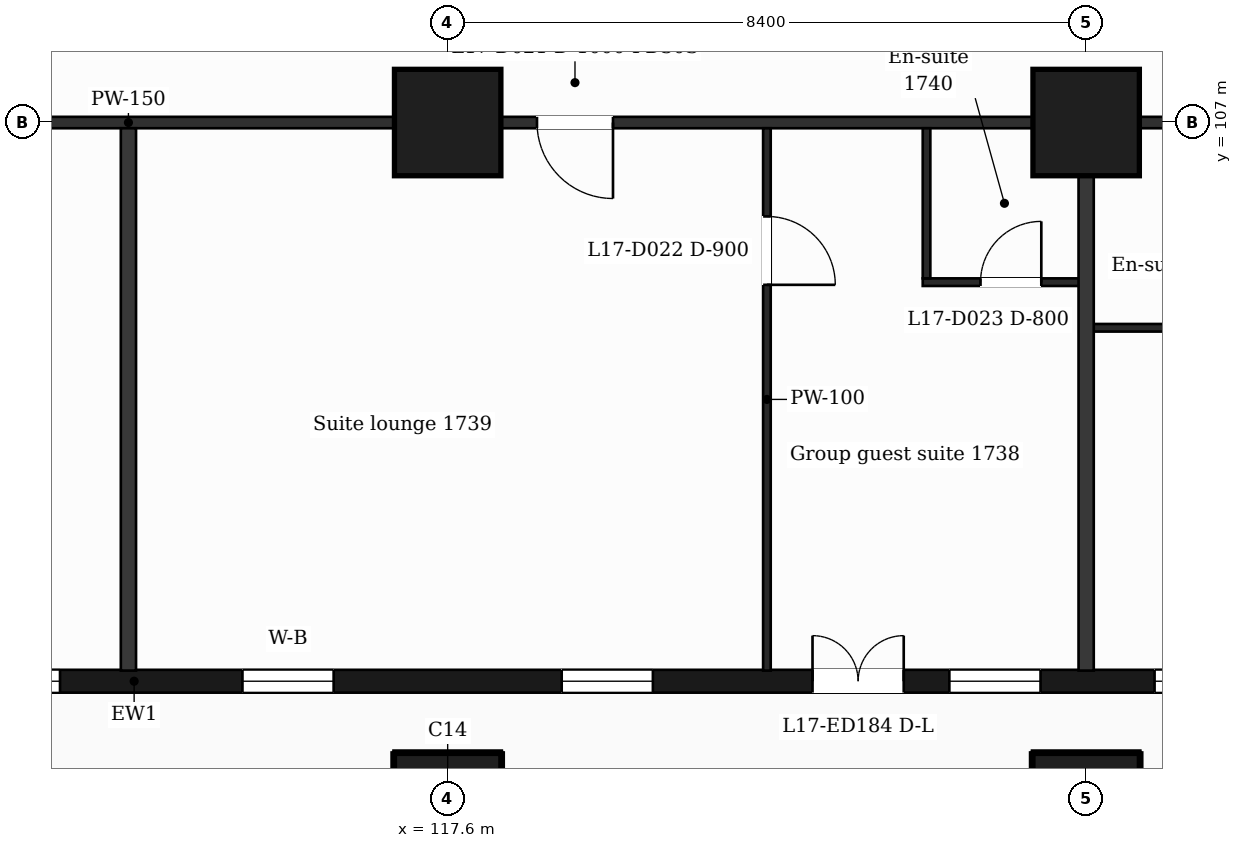
"""IFC4 building model, lengths in metres.
Left out: names, types, materials, properties, quantities, classifications, styles, units other than length and angle.
Written with IfcOpenShell. Run it as: python <this file> out.ifc"""

import sys

from ifc_helpers import new_model, si_unit, direction, frame, frame_2d, origin, origin_2d, place, context, subcontext, project, spatial, rectangle, extrude, element, fill, save


model = new_model("IFC4")
c1 = context("Model", 3, precision=1e-05, world=origin(), true_north=direction((0.0, 1.0)))
c2 = subcontext(c1, "Body", "Model", "MODEL_VIEW")
j1 = project(units=[si_unit("LENGTHUNIT", "METRE"), si_unit("PLANEANGLEUNIT", "RADIAN")], contexts=[c1])
p1 = place(None, origin())
s1 = spatial("IfcSite", under=j1, at=p1, CompositionType="ELEMENT")
p2 = place(p1, origin())
s2 = spatial("IfcBuilding", under=s1, at=p2, CompositionType="ELEMENT")
p3 = place(p2, frame((0.0, 0.0, 77.5)))
s3 = spatial("IfcBuildingStorey", under=s2, at=p3, CompositionType="ELEMENT", Elevation=77.5)
for number, where, z_axis, x_axis in (
    (1, (117.6, 98.0, 0.0), (0.0, 0.0, 1.0), (1.0, 0.0, 0.0)),
    (2, (126.0, 98.0, 0.0), (0.0, 0.0, 1.0), (1.0, 0.0, 0.0)),
    (3, (117.6, 107.0, 0.0), (0.0, 0.0, 1.0), (1.0, 0.0, 0.0)),
    (4, (126.0, 107.0, 0.0), (0.0, 0.0, 1.0), (1.0, 0.0, 0.0)),
):
    element("IfcColumn", number, at=place(p3, frame(where, z_axis=z_axis, x_axis=x_axis)), inside=s3, PredefinedType="COLUMN", context=c2, shape_type="SweptSolid", body=[
        extrude(rectangle(XDim=1.4, YDim=1.4, at=origin_2d()), origin(), (0.0, 0.0, 1.0), 3.5),
    ])
p4 = place(p3, frame((89.85, 99.65, 0.0), z_axis=(0.0, 0.0, 1.0), x_axis=(1.0, 0.0, 0.0)))
e5 = element("IfcWall", 5, at=p4, inside=s3, PredefinedType="SOLIDWALL", context=c2, shape_type="SweptSolid", body=[
    extrude(rectangle(XDim=47.25, YDim=0.3, at=frame_2d((23.625, 0.0))), origin(), (0.0, 0.0, 1.0), 3.0),
])
p5 = place(p4, frame((0.725, 0.0, 0.9)))
e6 = element("IfcOpeningElement", 6, at=p5, cuts=e5, PredefinedType="OPENING", context=c2, shape_type="SweptSolid", body=[
    extrude(rectangle(XDim=1.2, YDim=2.1, at=frame_2d((0.6, 1.05))), frame((0.0, 0.16, 0.0), z_axis=(0.0, -1.0, 0.0), x_axis=(1.0, 0.0, 0.0)), (0.0, 0.0, 1.0), 0.32),
])
p6 = place(p4, frame((3.45, 0.0, 0.9)))
e7 = element("IfcOpeningElement", 7, at=p6, cuts=e5, PredefinedType="OPENING", context=c2, shape_type="SweptSolid", body=[
    extrude(rectangle(XDim=2.4, YDim=2.1, at=frame_2d((1.2, 1.05))), frame((0.0, 0.16, 0.0), z_axis=(0.0, -1.0, 0.0), x_axis=(1.0, 0.0, 0.0)), (0.0, 0.0, 1.0), 0.32),
])
p7 = place(p4, frame((7.65, 0.0, 0.9)))
e8 = element("IfcOpeningElement", 8, at=p7, cuts=e5, PredefinedType="OPENING", context=c2, shape_type="SweptSolid", body=[
    extrude(rectangle(XDim=2.4, YDim=2.1, at=frame_2d((1.2, 1.05))), frame((0.0, 0.16, 0.0), z_axis=(0.0, -1.0, 0.0), x_axis=(1.0, 0.0, 0.0)), (0.0, 0.0, 1.0), 0.32),
])
p8 = place(p4, frame((11.85, 0.0, 0.9)))
e9 = element("IfcOpeningElement", 9, at=p8, cuts=e5, PredefinedType="OPENING", context=c2, shape_type="SweptSolid", body=[
    extrude(rectangle(XDim=2.4, YDim=2.1, at=frame_2d((1.2, 1.05))), frame((0.0, 0.16, 0.0), z_axis=(0.0, -1.0, 0.0), x_axis=(1.0, 0.0, 0.0)), (0.0, 0.0, 1.0), 0.32),
])
p9 = place(p4, frame((16.05, 0.0, 0.9)))
e10 = element("IfcOpeningElement", 10, at=p9, cuts=e5, PredefinedType="OPENING", context=c2, shape_type="SweptSolid", body=[
    extrude(rectangle(XDim=2.4, YDim=2.1, at=frame_2d((1.2, 1.05))), frame((0.0, 0.16, 0.0), z_axis=(0.0, -1.0, 0.0), x_axis=(1.0, 0.0, 0.0)), (0.0, 0.0, 1.0), 0.32),
])
p10 = place(p4, frame((20.25, 0.0, 0.9)))
e11 = element("IfcOpeningElement", 11, at=p10, cuts=e5, PredefinedType="OPENING", context=c2, shape_type="SweptSolid", body=[
    extrude(rectangle(XDim=2.4, YDim=2.1, at=frame_2d((1.2, 1.05))), frame((0.0, 0.16, 0.0), z_axis=(0.0, -1.0, 0.0), x_axis=(1.0, 0.0, 0.0)), (0.0, 0.0, 1.0), 0.32),
])
p11 = place(p4, frame((25.05, 0.0, 0.9)))
e12 = element("IfcOpeningElement", 12, at=p11, cuts=e5, PredefinedType="OPENING", context=c2, shape_type="SweptSolid", body=[
    extrude(rectangle(XDim=1.2, YDim=2.1, at=frame_2d((0.6, 1.05))), frame((0.0, 0.16, 0.0), z_axis=(0.0, -1.0, 0.0), x_axis=(1.0, 0.0, 0.0)), (0.0, 0.0, 1.0), 0.32),
])
p12 = place(p4, frame((29.25, 0.0, 0.9)))
e13 = element("IfcOpeningElement", 13, at=p12, cuts=e5, PredefinedType="OPENING", context=c2, shape_type="SweptSolid", body=[
    extrude(rectangle(XDim=1.2, YDim=2.1, at=frame_2d((0.6, 1.05))), frame((0.0, 0.16, 0.0), z_axis=(0.0, -1.0, 0.0), x_axis=(1.0, 0.0, 0.0)), (0.0, 0.0, 1.0), 0.32),
])
p13 = place(p4, frame((32.55, 0.0, 0.0)))
e14 = element("IfcOpeningElement", 14, at=p13, cuts=e5, PredefinedType="OPENING", context=c2, shape_type="SweptSolid", body=[
    extrude(rectangle(XDim=1.2, YDim=2.4, at=frame_2d((0.6, 1.2))), frame((0.0, 0.16, 0.0), z_axis=(0.0, -1.0, 0.0), x_axis=(1.0, 0.0, 0.0)), (0.0, 0.0, 1.0), 0.32),
])
p14 = place(p4, frame((34.35, 0.0, 0.9)))
e15 = element("IfcOpeningElement", 15, at=p14, cuts=e5, PredefinedType="OPENING", context=c2, shape_type="SweptSolid", body=[
    extrude(rectangle(XDim=1.2, YDim=2.1, at=frame_2d((0.6, 1.05))), frame((0.0, 0.16, 0.0), z_axis=(0.0, -1.0, 0.0), x_axis=(1.0, 0.0, 0.0)), (0.0, 0.0, 1.0), 0.32),
])
p15 = place(p4, frame((37.05, 0.0, 0.9)))
e16 = element("IfcOpeningElement", 16, at=p15, cuts=e5, PredefinedType="OPENING", context=c2, shape_type="SweptSolid", body=[
    extrude(rectangle(XDim=2.4, YDim=2.1, at=frame_2d((1.2, 1.05))), frame((0.0, 0.16, 0.0), z_axis=(0.0, -1.0, 0.0), x_axis=(1.0, 0.0, 0.0)), (0.0, 0.0, 1.0), 0.32),
])
p16 = place(p4, frame((40.95, 0.0, 0.0)))
e17 = element("IfcOpeningElement", 17, at=p16, cuts=e5, PredefinedType="OPENING", context=c2, shape_type="SweptSolid", body=[
    extrude(rectangle(XDim=1.2, YDim=2.4, at=frame_2d((0.6, 1.2))), frame((0.0, 0.16, 0.0), z_axis=(0.0, -1.0, 0.0), x_axis=(1.0, 0.0, 0.0)), (0.0, 0.0, 1.0), 0.32),
])
p17 = place(p4, frame((42.75, 0.0, 0.9)))
e18 = element("IfcOpeningElement", 18, at=p17, cuts=e5, PredefinedType="OPENING", context=c2, shape_type="SweptSolid", body=[
    extrude(rectangle(XDim=1.2, YDim=2.1, at=frame_2d((0.6, 1.05))), frame((0.0, 0.16, 0.0), z_axis=(0.0, -1.0, 0.0), x_axis=(1.0, 0.0, 0.0)), (0.0, 0.0, 1.0), 0.32),
])
p18 = place(p4, frame((45.25, 0.0, 0.9)))
e19 = element("IfcOpeningElement", 19, at=p18, cuts=e5, PredefinedType="OPENING", context=c2, shape_type="SweptSolid", body=[
    extrude(rectangle(XDim=1.2, YDim=2.1, at=frame_2d((0.6, 1.05))), frame((0.0, 0.16, 0.0), z_axis=(0.0, -1.0, 0.0), x_axis=(1.0, 0.0, 0.0)), (0.0, 0.0, 1.0), 0.32),
])
p19 = place(p3, frame((126.0, 104.3, 0.0), z_axis=(0.0, 0.0, 1.0), x_axis=(1.0, 0.0, 0.0)))
e20 = element("IfcWall", 20, at=p19, inside=s3, PredefinedType="PARTITIONING", context=c2, shape_type="SweptSolid", body=[
    extrude(rectangle(XDim=2.45, YDim=0.1, at=frame_2d((1.225, 0.0))), origin(), (0.0, 0.0, 1.0), 3.0),
])
p20 = place(p3, frame((123.85, 104.9, 0.0), z_axis=(0.0, 0.0, 1.0), x_axis=(1.0, 0.0, 0.0)))
e21 = element("IfcWall", 21, at=p20, inside=s3, PredefinedType="PARTITIONING", context=c2, shape_type="SweptSolid", body=[
    extrude(rectangle(XDim=2.15, YDim=0.1, at=frame_2d((1.075, 0.0))), origin(), (0.0, 0.0, 1.0), 3.0),
])
p21 = place(p20, frame((0.76, 0.0, 0.0)))
e22 = element("IfcOpeningElement", 22, at=p21, cuts=e21, PredefinedType="OPENING", context=c2, shape_type="SweptSolid", body=[
    extrude(rectangle(XDim=0.8, YDim=2.1, at=frame_2d((0.4, 1.05))), frame((0.0, 0.06, 0.0), z_axis=(0.0, -1.0, 0.0), x_axis=(1.0, 0.0, 0.0)), (0.0, 0.0, 1.0), 0.12),
])
p22 = place(p3, frame((87.018, 107.0, 0.0), z_axis=(0.0, 0.0, 1.0), x_axis=(1.0, 0.0, 0.0)))
e23 = element("IfcWall", 23, at=p22, inside=s3, PredefinedType="PARTITIONING", context=c2, shape_type="SweptSolid", body=[
    extrude(rectangle(XDim=52.765, YDim=0.15, at=frame_2d((26.382, 0.0))), origin(), (0.0, 0.0, 1.0), 3.0),
])
p23 = place(p22, frame((1.276, 0.0, 0.0)))
e24 = element("IfcOpeningElement", 24, at=p23, cuts=e23, PredefinedType="OPENING", context=c2, shape_type="SweptSolid", body=[
    extrude(rectangle(XDim=0.95, YDim=2.1, at=frame_2d((0.475, 1.05))), frame((0.0, 0.085, 0.0), z_axis=(0.0, -1.0, 0.0), x_axis=(1.0, 0.0, 0.0)), (0.0, 0.0, 1.0), 0.17),
])
p24 = place(p22, frame((10.757, 0.0, 0.0)))
e25 = element("IfcOpeningElement", 25, at=p24, cuts=e23, PredefinedType="OPENING", context=c2, shape_type="SweptSolid", body=[
    extrude(rectangle(XDim=1.0, YDim=2.1, at=frame_2d((0.5, 1.05))), frame((0.0, 0.085, 0.0), z_axis=(0.0, -1.0, 0.0), x_axis=(1.0, 0.0, 0.0)), (0.0, 0.0, 1.0), 0.17),
])
p25 = place(p22, frame((23.125, 0.0, 0.0)))
e26 = element("IfcOpeningElement", 26, at=p25, cuts=e23, PredefinedType="OPENING", context=c2, shape_type="SweptSolid", body=[
    extrude(rectangle(XDim=0.95, YDim=2.1, at=frame_2d((0.475, 1.05))), frame((0.0, 0.085, 0.0), z_axis=(0.0, -1.0, 0.0), x_axis=(1.0, 0.0, 0.0)), (0.0, 0.0, 1.0), 0.17),
])
p26 = place(p22, frame((31.757, 0.0, 0.0)))
e27 = element("IfcOpeningElement", 27, at=p26, cuts=e23, PredefinedType="OPENING", context=c2, shape_type="SweptSolid", body=[
    extrude(rectangle(XDim=1.0, YDim=2.1, at=frame_2d((0.5, 1.05))), frame((0.0, 0.085, 0.0), z_axis=(0.0, -1.0, 0.0), x_axis=(1.0, 0.0, 0.0)), (0.0, 0.0, 1.0), 0.17),
])
p27 = place(p22, frame((42.819, 0.0, 0.0)))
e28 = element("IfcOpeningElement", 28, at=p27, cuts=e23, PredefinedType="OPENING", context=c2, shape_type="SweptSolid", body=[
    extrude(rectangle(XDim=0.95, YDim=2.1, at=frame_2d((0.475, 1.05))), frame((0.0, 0.085, 0.0), z_axis=(0.0, -1.0, 0.0), x_axis=(1.0, 0.0, 0.0)), (0.0, 0.0, 1.0), 0.17),
])
p28 = place(p22, frame((48.974, 0.0, 0.0)))
e29 = element("IfcOpeningElement", 29, at=p28, cuts=e23, PredefinedType="OPENING", context=c2, shape_type="SweptSolid", body=[
    extrude(rectangle(XDim=0.95, YDim=2.1, at=frame_2d((0.475, 1.05))), frame((0.0, 0.085, 0.0), z_axis=(0.0, -1.0, 0.0), x_axis=(1.0, 0.0, 0.0)), (0.0, 0.0, 1.0), 0.17),
])
p29 = place(p3, frame((113.4, 99.79, 0.0), z_axis=(0.0, 0.0, 1.0), x_axis=(0.0, 1.0, 0.0)))
e30 = element("IfcWall", 30, at=p29, inside=s3, PredefinedType="PARTITIONING", context=c2, shape_type="SweptSolid", body=[
    extrude(rectangle(XDim=7.135, YDim=0.2, at=frame_2d((3.567, 0.0))), origin(), (0.0, 0.0, 1.0), 3.0),
])
p30 = place(p3, frame((121.8, 99.79, 0.0), z_axis=(0.0, 0.0, 1.0), x_axis=(0.0, 1.0, 0.0)))
e31 = element("IfcWall", 31, at=p30, inside=s3, PredefinedType="PARTITIONING", context=c2, shape_type="SweptSolid", body=[
    extrude(rectangle(XDim=7.135, YDim=0.1, at=frame_2d((3.567, 0.0))), origin(), (0.0, 0.0, 1.0), 3.0),
])
p31 = place(p30, frame((5.075, 0.0, 0.0)))
e32 = element("IfcOpeningElement", 32, at=p31, cuts=e31, PredefinedType="OPENING", context=c2, shape_type="SweptSolid", body=[
    extrude(rectangle(XDim=0.9, YDim=2.1, at=frame_2d((0.45, 1.05))), frame((0.0, 0.06, 0.0), z_axis=(0.0, -1.0, 0.0), x_axis=(1.0, 0.0, 0.0)), (0.0, 0.0, 1.0), 0.12),
])
p32 = place(p3, frame((123.9, 104.95, 0.0), z_axis=(0.0, 0.0, 1.0), x_axis=(0.0, 1.0, 0.0)))
e33 = element("IfcWall", 33, at=p32, inside=s3, PredefinedType="PARTITIONING", context=c2, shape_type="SweptSolid", body=[
    extrude(rectangle(XDim=1.975, YDim=0.1, at=frame_2d((0.988, 0.0))), origin(), (0.0, 0.0, 1.0), 3.0),
])
p33 = place(p3, frame((126.0, 99.79, 0.0), z_axis=(0.0, 0.0, 1.0), x_axis=(0.0, 1.0, 0.0)))
e34 = element("IfcWall", 34, at=p33, inside=s3, PredefinedType="PARTITIONING", context=c2, shape_type="SweptSolid", body=[
    extrude(rectangle(XDim=7.135, YDim=0.2, at=frame_2d((3.567, 0.0))), origin(), (0.0, 0.0, 1.0), 3.0),
])
p34 = place(p10, origin())
e35 = element("IfcWindow", 35, at=p34, inside=s3, PartitioningType="SINGLE_PANEL", PredefinedType="WINDOW", context=c2, shape_type="SweptSolid", body=[
    extrude(rectangle(XDim=2.4, YDim=2.1, at=frame_2d((1.2, 1.05))), frame((0.0, 0.03, 0.0), z_axis=(0.0, -1.0, 0.0), x_axis=(1.0, 0.0, 0.0)), (0.0, 0.0, 1.0), 0.06),
])
fill(e11, e35)
p35 = place(p11, origin())
e36 = element("IfcWindow", 36, at=p35, inside=s3, PartitioningType="SINGLE_PANEL", PredefinedType="WINDOW", context=c2, shape_type="SweptSolid", body=[
    extrude(rectangle(XDim=1.2, YDim=2.1, at=frame_2d((0.6, 1.05))), frame((0.0, 0.03, 0.0), z_axis=(0.0, -1.0, 0.0), x_axis=(1.0, 0.0, 0.0)), (0.0, 0.0, 1.0), 0.06),
])
fill(e12, e36)
p36 = place(p12, origin())
e37 = element("IfcWindow", 37, at=p36, inside=s3, PartitioningType="SINGLE_PANEL", PredefinedType="WINDOW", context=c2, shape_type="SweptSolid", body=[
    extrude(rectangle(XDim=1.2, YDim=2.1, at=frame_2d((0.6, 1.05))), frame((0.0, 0.03, 0.0), z_axis=(0.0, -1.0, 0.0), x_axis=(1.0, 0.0, 0.0)), (0.0, 0.0, 1.0), 0.06),
])
fill(e13, e37)
p37 = place(p13, origin())
e38 = element("IfcDoor", 38, at=p37, inside=s3, OperationType="DOUBLE_DOOR_SINGLE_SWING", PredefinedType="DOOR", context=c2, shape_type="SweptSolid", body=[
    extrude(rectangle(XDim=1.2, YDim=2.4, at=frame_2d((0.6, 1.2))), frame((0.0, 0.025, 0.0), z_axis=(0.0, -1.0, 0.0), x_axis=(1.0, 0.0, 0.0)), (0.0, 0.0, 1.0), 0.05),
])
fill(e14, e38)
p38 = place(p14, origin())
e39 = element("IfcWindow", 39, at=p38, inside=s3, PartitioningType="SINGLE_PANEL", PredefinedType="WINDOW", context=c2, shape_type="SweptSolid", body=[
    extrude(rectangle(XDim=1.2, YDim=2.1, at=frame_2d((0.6, 1.05))), frame((0.0, 0.03, 0.0), z_axis=(0.0, -1.0, 0.0), x_axis=(1.0, 0.0, 0.0)), (0.0, 0.0, 1.0), 0.06),
])
fill(e15, e39)
p39 = place(p15, origin())
e40 = element("IfcWindow", 40, at=p39, inside=s3, PartitioningType="SINGLE_PANEL", PredefinedType="WINDOW", context=c2, shape_type="SweptSolid", body=[
    extrude(rectangle(XDim=2.4, YDim=2.1, at=frame_2d((1.2, 1.05))), frame((0.0, 0.03, 0.0), z_axis=(0.0, -1.0, 0.0), x_axis=(1.0, 0.0, 0.0)), (0.0, 0.0, 1.0), 0.06),
])
fill(e16, e40)
p40 = place(p26, origin())
e41 = element("IfcDoor", 41, at=p40, inside=s3, OperationType="SINGLE_SWING_RIGHT", PredefinedType="DOOR", context=c2, shape_type="SweptSolid", body=[
    extrude(rectangle(XDim=1.0, YDim=2.1, at=frame_2d((0.5, 1.05))), frame((0.0, 0.025, 0.0), z_axis=(0.0, -1.0, 0.0), x_axis=(1.0, 0.0, 0.0)), (0.0, 0.0, 1.0), 0.05),
])
fill(e27, e41)
p41 = place(p31, origin())
e42 = element("IfcDoor", 42, at=p41, inside=s3, OperationType="SINGLE_SWING_LEFT", PredefinedType="DOOR", context=c2, shape_type="SweptSolid", body=[
    extrude(rectangle(XDim=0.9, YDim=2.1, at=frame_2d((0.45, 1.05))), frame((0.0, 0.025, 0.0), z_axis=(0.0, -1.0, 0.0), x_axis=(1.0, 0.0, 0.0)), (0.0, 0.0, 1.0), 0.05),
])
fill(e32, e42)
p42 = place(p21, origin())
e43 = element("IfcDoor", 43, at=p42, inside=s3, OperationType="SINGLE_SWING_RIGHT", PredefinedType="DOOR", context=c2, shape_type="SweptSolid", body=[
    extrude(rectangle(XDim=0.8, YDim=2.1, at=frame_2d((0.4, 1.05))), frame((0.0, 0.025, 0.0), z_axis=(0.0, -1.0, 0.0), x_axis=(1.0, 0.0, 0.0)), (0.0, 0.0, 1.0), 0.05),
])
fill(e22, e43)
save(model, sys.argv[1])
